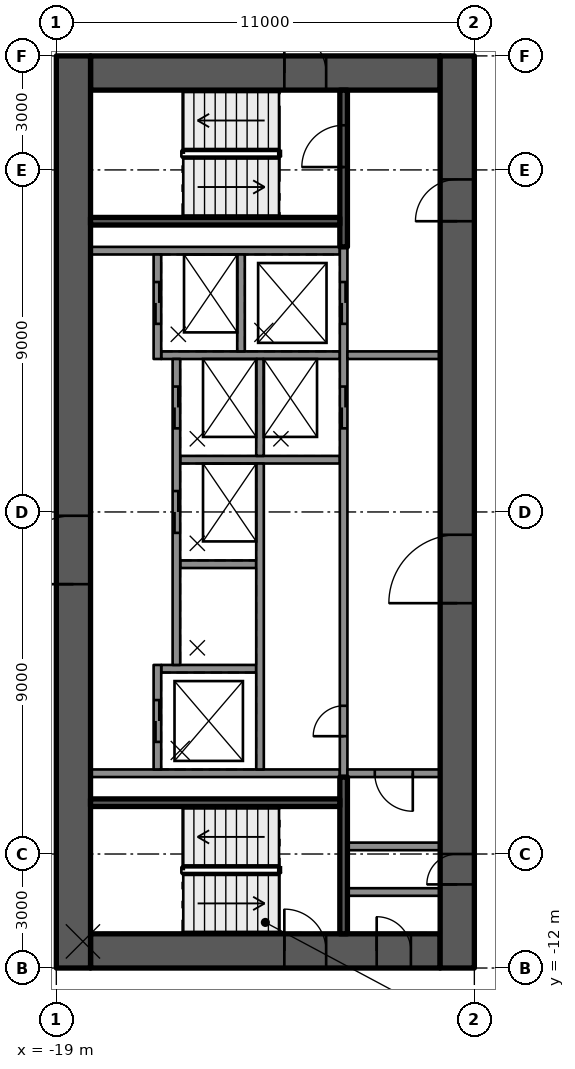
"""IFC4 building model, lengths in metres.
Left out: names, types, materials, properties, quantities, classifications, styles, units other than length and angle.
Written with IfcOpenShell. Run it as: python <this file> out.ifc"""

import sys

from ifc_helpers import new_model, si_unit, direction, frame, frame_2d, origin, place, context, subcontext, project, spatial, rectangle, extrude, element, fill, save


model = new_model("IFC4")
c1 = context("Model", 3, precision=1e-05, world=origin(), true_north=direction((0.0, 1.0)))
c2 = subcontext(c1, "Body", "Model", "MODEL_VIEW")
j1 = project(units=[si_unit("LENGTHUNIT", "METRE"), si_unit("PLANEANGLEUNIT", "RADIAN")], contexts=[c1])
p1 = place(None, origin())
s1 = spatial("IfcSite", under=j1, at=p1, CompositionType="ELEMENT")
p2 = place(p1, origin())
s2 = spatial("IfcBuilding", under=s1, at=p2, CompositionType="ELEMENT")
p3 = place(p2, frame((0.0, 0.0, 170.6)))
s3 = spatial("IfcBuildingStorey", under=s2, at=p3, CompositionType="ELEMENT", Elevation=170.6)
p4 = place(p3, frame((-18.1, 11.55, 0.0), z_axis=(0.0, 0.0, 1.0), x_axis=(1.0, 0.0, 0.0)))
e1 = element("IfcWall", 1, at=p4, inside=s3, PredefinedType="SHEAR", context=c2, shape_type="SweptSolid", body=[
    extrude(rectangle(XDim=9.2, YDim=0.9, at=frame_2d((4.6, 0.0))), origin(), (0.0, 0.0, 1.0), 3.5),
])
p5 = place(p4, frame((5.1, 0.0, 0.0)))
e2 = element("IfcOpeningElement", 2, at=p5, cuts=e1, PredefinedType="OPENING", context=c2, shape_type="SweptSolid", body=[
    extrude(rectangle(XDim=1.1, YDim=2.1, at=frame_2d((0.55, 1.05))), frame((0.0, 0.46, 0.0), z_axis=(0.0, -1.0, 0.0), x_axis=(1.0, 0.0, 0.0)), (0.0, 0.0, 1.0), 0.92),
])
p6 = place(p3, frame((-18.1, -11.55, 0.0), z_axis=(0.0, 0.0, 1.0), x_axis=(1.0, 0.0, 0.0)))
e3 = element("IfcWall", 3, at=p6, inside=s3, PredefinedType="SHEAR", context=c2, shape_type="SweptSolid", body=[
    extrude(rectangle(XDim=9.2, YDim=0.9, at=frame_2d((4.6, 0.0))), origin(), (0.0, 0.0, 1.0), 3.5),
])
p7 = place(p6, frame((5.1, 0.0, 0.0)))
e4 = element("IfcOpeningElement", 4, at=p7, cuts=e3, PredefinedType="OPENING", context=c2, shape_type="SweptSolid", body=[
    extrude(rectangle(XDim=1.1, YDim=2.1, at=frame_2d((0.55, 1.05))), frame((0.0, 0.46, 0.0), z_axis=(0.0, -1.0, 0.0), x_axis=(1.0, 0.0, 0.0)), (0.0, 0.0, 1.0), 0.92),
])
p8 = place(p6, frame((7.53, 0.0, 0.0)))
e5 = element("IfcOpeningElement", 5, at=p8, cuts=e3, PredefinedType="OPENING", context=c2, shape_type="SweptSolid", body=[
    extrude(rectangle(XDim=0.9, YDim=2.1, at=frame_2d((0.45, 1.05))), frame((0.0, 0.46, 0.0), z_axis=(0.0, -1.0, 0.0), x_axis=(1.0, 0.0, 0.0)), (0.0, 0.0, 1.0), 0.92),
])
p9 = place(p3, frame((-18.55, -12.0, 0.0), z_axis=(0.0, 0.0, 1.0), x_axis=(0.0, 1.0, 0.0)))
e6 = element("IfcWall", 6, at=p9, inside=s3, PredefinedType="SHEAR", context=c2, shape_type="SweptSolid", body=[
    extrude(rectangle(XDim=24.0, YDim=0.9, at=frame_2d((12.0, 0.0))), origin(), (0.0, 0.0, 1.0), 3.5),
])
p10 = place(p9, frame((10.1, 0.0, 0.0)))
e7 = element("IfcOpeningElement", 7, at=p10, cuts=e6, PredefinedType="OPENING", context=c2, shape_type="SweptSolid", body=[
    extrude(rectangle(XDim=1.8, YDim=2.1, at=frame_2d((0.9, 1.05))), frame((0.0, 0.46, 0.0), z_axis=(0.0, -1.0, 0.0), x_axis=(1.0, 0.0, 0.0)), (0.0, 0.0, 1.0), 0.92),
])
p11 = place(p3, frame((-8.45, -12.0, 0.0), z_axis=(0.0, 0.0, 1.0), x_axis=(0.0, 1.0, 0.0)))
e8 = element("IfcWall", 8, at=p11, inside=s3, PredefinedType="SHEAR", context=c2, shape_type="SweptSolid", body=[
    extrude(rectangle(XDim=24.0, YDim=0.9, at=frame_2d((12.0, 0.0))), origin(), (0.0, 0.0, 1.0), 3.5),
])
p12 = place(p11, frame((9.6, 0.0, 0.0)))
e9 = element("IfcOpeningElement", 9, at=p12, cuts=e8, PredefinedType="OPENING", context=c2, shape_type="SweptSolid", body=[
    extrude(rectangle(XDim=1.8, YDim=2.1, at=frame_2d((0.9, 1.05))), frame((0.0, 0.46, 0.0), z_axis=(0.0, -1.0, 0.0), x_axis=(1.0, 0.0, 0.0)), (0.0, 0.0, 1.0), 0.92),
])
p13 = place(p11, frame((19.65, 0.0, 0.0)))
e10 = element("IfcOpeningElement", 10, at=p13, cuts=e8, PredefinedType="OPENING", context=c2, shape_type="SweptSolid", body=[
    extrude(rectangle(XDim=1.1, YDim=2.1, at=frame_2d((0.55, 1.05))), frame((0.0, 0.46, 0.0), z_axis=(0.0, -1.0, 0.0), x_axis=(1.0, 0.0, 0.0)), (0.0, 0.0, 1.0), 0.92),
])
p14 = place(p11, frame((2.2, 0.0, 0.0)))
e11 = element("IfcOpeningElement", 11, at=p14, cuts=e8, PredefinedType="OPENING", context=c2, shape_type="SweptSolid", body=[
    extrude(rectangle(XDim=0.8, YDim=2.1, at=frame_2d((0.4, 1.05))), frame((0.0, 0.46, 0.0), z_axis=(0.0, -1.0, 0.0), x_axis=(1.0, 0.0, 0.0)), (0.0, 0.0, 1.0), 0.92),
])
for number, where, z_axis, x_axis in (
    (12, (-11.54, 6.875, 0.0), (0.0, 0.0, 1.0), (-1.0, 0.0, 0.0)),
    (13, (-11.54, -6.875, 0.0), (0.0, 0.0, 1.0), (-1.0, 0.0, 0.0)),
):
    element("IfcWall", number, at=place(p3, frame(where, z_axis=z_axis, x_axis=x_axis)), inside=s3, PredefinedType="SOLIDWALL", context=c2, shape_type="SweptSolid", body=[
        extrude(rectangle(XDim=6.56, YDim=0.2, at=frame_2d((3.28, 0.0))), origin(), (0.0, 0.0, 1.0), 3.08),
    ])
p15 = place(p3, frame((-13.74, -4.125, 0.0), z_axis=(0.0, 0.0, 1.0), x_axis=(-1.0, 0.0, 0.0)))
e14 = element("IfcWall", 14, at=p15, inside=s3, PredefinedType="SOLIDWALL", context=c2, shape_type="SweptSolid", body=[
    extrude(rectangle(XDim=2.5, YDim=0.2, at=frame_2d((1.25, 0.0))), origin(), (0.0, 0.0, 1.0), 3.08),
])
p16 = place(p3, frame((-13.74, -1.375, 0.0), z_axis=(0.0, 0.0, 1.0), x_axis=(-1.0, 0.0, 0.0)))
e15 = element("IfcWall", 15, at=p16, inside=s3, PredefinedType="SOLIDWALL", context=c2, shape_type="SweptSolid", body=[
    extrude(rectangle(XDim=2.0, YDim=0.2, at=frame_2d((1.0, 0.0))), origin(), (0.0, 0.0, 1.0), 3.08),
])
p17 = place(p3, frame((-11.54, 1.375, 0.0), z_axis=(0.0, 0.0, 1.0), x_axis=(-1.0, 0.0, 0.0)))
e16 = element("IfcWall", 16, at=p17, inside=s3, PredefinedType="SOLIDWALL", context=c2, shape_type="SweptSolid", body=[
    extrude(rectangle(XDim=4.2, YDim=0.2, at=frame_2d((2.1, 0.0))), origin(), (0.0, 0.0, 1.0), 3.08),
])
p18 = place(p3, frame((-11.54, 4.125, 0.0), z_axis=(0.0, 0.0, 1.0), x_axis=(-1.0, 0.0, 0.0)))
e17 = element("IfcWall", 17, at=p18, inside=s3, PredefinedType="SOLIDWALL", context=c2, shape_type="SweptSolid", body=[
    extrude(rectangle(XDim=4.7, YDim=0.2, at=frame_2d((2.35, 0.0))), origin(), (0.0, 0.0, 1.0), 3.08),
])
p19 = place(p3, frame((-11.44, -6.975, 0.0), z_axis=(0.0, 0.0, 1.0), x_axis=(0.0, 1.0, 0.0)))
e18 = element("IfcWall", 18, at=p19, inside=s3, PredefinedType="SOLIDWALL", context=c2, shape_type="SweptSolid", body=[
    extrude(rectangle(XDim=13.95, YDim=0.2, at=frame_2d((6.975, 0.0))), origin(), (0.0, 0.0, 1.0), 3.08),
])
p20 = place(p19, frame((9.175, 0.0, 0.0)))
e19 = element("IfcOpeningElement", 19, at=p20, cuts=e18, PredefinedType="OPENING", context=c2, shape_type="SweptSolid", body=[
    extrude(rectangle(XDim=1.1, YDim=2.1, at=frame_2d((0.55, 1.05))), frame((0.0, 0.11, 0.0), z_axis=(0.0, -1.0, 0.0), x_axis=(1.0, 0.0, 0.0)), (0.0, 0.0, 1.0), 0.22),
])
p21 = place(p19, frame((11.925, 0.0, 0.0)))
e20 = element("IfcOpeningElement", 20, at=p21, cuts=e18, PredefinedType="OPENING", context=c2, shape_type="SweptSolid", body=[
    extrude(rectangle(XDim=1.1, YDim=2.1, at=frame_2d((0.55, 1.05))), frame((0.0, 0.11, 0.0), z_axis=(0.0, -1.0, 0.0), x_axis=(1.0, 0.0, 0.0)), (0.0, 0.0, 1.0), 0.22),
])
p22 = place(p19, frame((1.075, 0.0, 0.0)))
e21 = element("IfcOpeningElement", 21, at=p22, cuts=e18, PredefinedType="OPENING", context=c2, shape_type="SweptSolid", body=[
    extrude(rectangle(XDim=0.8, YDim=2.1, at=frame_2d((0.4, 1.05))), frame((0.0, 0.11, 0.0), z_axis=(0.0, -1.0, 0.0), x_axis=(1.0, 0.0, 0.0)), (0.0, 0.0, 1.0), 0.22),
])
p23 = place(p3, frame((-13.64, -6.775, 0.0), z_axis=(0.0, 0.0, 1.0), x_axis=(0.0, 1.0, 0.0)))
e22 = element("IfcWall", 22, at=p23, inside=s3, PredefinedType="SOLIDWALL", context=c2, shape_type="SweptSolid", body=[
    extrude(rectangle(XDim=8.05, YDim=0.2, at=frame_2d((4.025, 0.0))), origin(), (0.0, 0.0, 1.0), 3.08),
])
for number, where, z_axis, x_axis in (
    (23, (-13.64, 1.475, 0.0), (0.0, 0.0, 1.0), (0.0, 1.0, 0.0)),
    (24, (-14.14, 4.225, 0.0), (0.0, 0.0, 1.0), (0.0, 1.0, 0.0)),
):
    element("IfcWall", number, at=place(p3, frame(where, z_axis=z_axis, x_axis=x_axis)), inside=s3, PredefinedType="SOLIDWALL", context=c2, shape_type="SweptSolid", body=[
        extrude(rectangle(XDim=2.55, YDim=0.2, at=frame_2d((1.275, 0.0))), origin(), (0.0, 0.0, 1.0), 3.08),
    ])
p24 = place(p3, frame((-16.34, -6.775, 0.0), z_axis=(0.0, 0.0, 1.0), x_axis=(0.0, 1.0, 0.0)))
e25 = element("IfcWall", 25, at=p24, inside=s3, PredefinedType="SOLIDWALL", context=c2, shape_type="SweptSolid", body=[
    extrude(rectangle(XDim=2.75, YDim=0.2, at=frame_2d((1.375, 0.0))), origin(), (0.0, 0.0, 1.0), 3.08),
])
p25 = place(p24, frame((0.725, 0.0, 0.0)))
e26 = element("IfcOpeningElement", 26, at=p25, cuts=e25, PredefinedType="OPENING", context=c2, shape_type="SweptSolid", body=[
    extrude(rectangle(XDim=1.1, YDim=2.1, at=frame_2d((0.55, 1.05))), frame((0.0, 0.11, 0.0), z_axis=(0.0, -1.0, 0.0), x_axis=(1.0, 0.0, 0.0)), (0.0, 0.0, 1.0), 0.22),
])
p26 = place(p3, frame((-15.84, -4.025, 0.0), z_axis=(0.0, 0.0, 1.0), x_axis=(0.0, 1.0, 0.0)))
e27 = element("IfcWall", 27, at=p26, inside=s3, PredefinedType="SOLIDWALL", context=c2, shape_type="SweptSolid", body=[
    extrude(rectangle(XDim=8.05, YDim=0.2, at=frame_2d((4.025, 0.0))), origin(), (0.0, 0.0, 1.0), 3.08),
])
p27 = place(p26, frame((3.475, 0.0, 0.0)))
e28 = element("IfcOpeningElement", 28, at=p27, cuts=e27, PredefinedType="OPENING", context=c2, shape_type="SweptSolid", body=[
    extrude(rectangle(XDim=1.1, YDim=2.1, at=frame_2d((0.55, 1.05))), frame((0.0, 0.11, 0.0), z_axis=(0.0, -1.0, 0.0), x_axis=(1.0, 0.0, 0.0)), (0.0, 0.0, 1.0), 0.22),
])
p28 = place(p26, frame((6.225, 0.0, 0.0)))
e29 = element("IfcOpeningElement", 29, at=p28, cuts=e27, PredefinedType="OPENING", context=c2, shape_type="SweptSolid", body=[
    extrude(rectangle(XDim=1.1, YDim=2.1, at=frame_2d((0.55, 1.05))), frame((0.0, 0.11, 0.0), z_axis=(0.0, -1.0, 0.0), x_axis=(1.0, 0.0, 0.0)), (0.0, 0.0, 1.0), 0.22),
])
p29 = place(p3, frame((-16.34, 4.025, 0.0), z_axis=(0.0, 0.0, 1.0), x_axis=(0.0, 1.0, 0.0)))
e30 = element("IfcWall", 30, at=p29, inside=s3, PredefinedType="SOLIDWALL", context=c2, shape_type="SweptSolid", body=[
    extrude(rectangle(XDim=2.75, YDim=0.2, at=frame_2d((1.375, 0.0))), origin(), (0.0, 0.0, 1.0), 3.08),
])
p30 = place(p29, frame((0.925, 0.0, 0.0)))
e31 = element("IfcOpeningElement", 31, at=p30, cuts=e30, PredefinedType="OPENING", context=c2, shape_type="SweptSolid", body=[
    extrude(rectangle(XDim=1.1, YDim=2.1, at=frame_2d((0.55, 1.05))), frame((0.0, 0.11, 0.0), z_axis=(0.0, -1.0, 0.0), x_axis=(1.0, 0.0, 0.0)), (0.0, 0.0, 1.0), 0.22),
])
p31 = place(p3, frame((-11.44, 6.975, 0.0), z_axis=(0.0, 0.0, 1.0), x_axis=(0.0, 1.0, 0.0)))
e32 = element("IfcWall", 32, at=p31, inside=s3, PredefinedType="SOLIDWALL", context=c2, shape_type="SweptSolid", body=[
    extrude(rectangle(XDim=4.125, YDim=0.2, at=frame_2d((2.062, 0.0))), origin(), (0.0, 0.0, 1.0), 3.08),
])
p32 = place(p31, frame((2.1, 0.0, 0.0)))
e33 = element("IfcOpeningElement", 33, at=p32, cuts=e32, PredefinedType="OPENING", context=c2, shape_type="SweptSolid", body=[
    extrude(rectangle(XDim=1.1, YDim=2.1, at=frame_2d((0.55, 1.05))), frame((0.0, 0.11, 0.0), z_axis=(0.0, -1.0, 0.0), x_axis=(1.0, 0.0, 0.0)), (0.0, 0.0, 1.0), 0.22),
])
p33 = place(p3, frame((-11.54, 7.65, 0.0), z_axis=(0.0, 0.0, 1.0), x_axis=(-1.0, 0.0, 0.0)))
e34 = element("IfcWall", 34, at=p33, inside=s3, PredefinedType="SOLIDWALL", context=c2, shape_type="SweptSolid", body=[
    extrude(rectangle(XDim=6.56, YDim=0.2, at=frame_2d((3.28, 0.0))), origin(), (0.0, 0.0, 1.0), 3.08),
])
p34 = place(p3, frame((-11.44, -11.1, 0.0), z_axis=(0.0, 0.0, 1.0), x_axis=(0.0, 1.0, 0.0)))
e35 = element("IfcWall", 35, at=p34, inside=s3, PredefinedType="SOLIDWALL", context=c2, shape_type="SweptSolid", body=[
    extrude(rectangle(XDim=4.125, YDim=0.2, at=frame_2d((2.062, 0.0))), origin(), (0.0, 0.0, 1.0), 3.08),
])
p35 = place(p3, frame((-11.54, -7.65, 0.0), z_axis=(0.0, 0.0, 1.0), x_axis=(-1.0, 0.0, 0.0)))
e36 = element("IfcWall", 36, at=p35, inside=s3, PredefinedType="SOLIDWALL", context=c2, shape_type="SweptSolid", body=[
    extrude(rectangle(XDim=6.56, YDim=0.2, at=frame_2d((3.28, 0.0))), origin(), (0.0, 0.0, 1.0), 3.08),
])
p36 = place(p3, frame((-8.9, 4.125, 0.0), z_axis=(0.0, 0.0, 1.0), x_axis=(-1.0, 0.0, 0.0)))
e37 = element("IfcWall", 37, at=p36, inside=s3, PredefinedType="PARTITIONING", context=c2, shape_type="SweptSolid", body=[
    extrude(rectangle(XDim=2.44, YDim=0.2, at=frame_2d((1.22, 0.0))), origin(), (0.0, 0.0, 1.0), 3.08),
])
p37 = place(p3, frame((-8.9, -6.875, 0.0), z_axis=(0.0, 0.0, 1.0), x_axis=(-1.0, 0.0, 0.0)))
e38 = element("IfcWall", 38, at=p37, inside=s3, PredefinedType="PARTITIONING", context=c2, shape_type="SweptSolid", body=[
    extrude(rectangle(XDim=2.44, YDim=0.2, at=frame_2d((1.22, 0.0))), origin(), (0.0, 0.0, 1.0), 3.08),
])
p38 = place(p37, frame((0.72, 0.0, 0.0)))
e39 = element("IfcOpeningElement", 39, at=p38, cuts=e38, PredefinedType="OPENING", context=c2, shape_type="SweptSolid", body=[
    extrude(rectangle(XDim=1.0, YDim=2.1, at=frame_2d((0.5, 1.05))), frame((0.0, 0.11, 0.0), z_axis=(0.0, -1.0, 0.0), x_axis=(1.0, 0.0, 0.0)), (0.0, 0.0, 1.0), 0.22),
])
for number, where, z_axis, x_axis in (
    (40, (-8.9, -10.0, 0.0), (0.0, 0.0, 1.0), (-1.0, 0.0, 0.0)),
    (41, (-8.9, -8.8, 0.0), (0.0, 0.0, 1.0), (-1.0, 0.0, 0.0)),
):
    element("IfcWall", number, at=place(p3, frame(where, z_axis=z_axis, x_axis=x_axis)), inside=s3, PredefinedType="PARTITIONING", context=c2, shape_type="SweptSolid", body=[
        extrude(rectangle(XDim=2.44, YDim=0.2, at=frame_2d((1.22, 0.0))), origin(), (0.0, 0.0, 1.0), 3.08),
    ])
p39 = place(p25, origin())
e42 = element("IfcDoor", 42, at=p39, inside=s3, OperationType="DOUBLE_DOOR_SLIDING", PredefinedType="DOOR", context=c2, shape_type="SweptSolid", body=[
    extrude(rectangle(XDim=1.1, YDim=2.1, at=frame_2d((0.55, 1.05))), frame((0.0, 0.025, 0.0), z_axis=(0.0, -1.0, 0.0), x_axis=(1.0, 0.0, 0.0)), (0.0, 0.0, 1.0), 0.05),
])
fill(e26, e42)
p40 = place(p27, origin())
e43 = element("IfcDoor", 43, at=p40, inside=s3, OperationType="DOUBLE_DOOR_SLIDING", PredefinedType="DOOR", context=c2, shape_type="SweptSolid", body=[
    extrude(rectangle(XDim=1.1, YDim=2.1, at=frame_2d((0.55, 1.05))), frame((0.0, 0.025, 0.0), z_axis=(0.0, -1.0, 0.0), x_axis=(1.0, 0.0, 0.0)), (0.0, 0.0, 1.0), 0.05),
])
fill(e28, e43)
p41 = place(p20, origin())
e44 = element("IfcDoor", 44, at=p41, inside=s3, OperationType="DOUBLE_DOOR_SLIDING", PredefinedType="DOOR", context=c2, shape_type="SweptSolid", body=[
    extrude(rectangle(XDim=1.1, YDim=2.1, at=frame_2d((0.55, 1.05))), frame((0.0, 0.025, 0.0), z_axis=(0.0, -1.0, 0.0), x_axis=(1.0, 0.0, 0.0)), (0.0, 0.0, 1.0), 0.05),
])
fill(e19, e44)
p42 = place(p28, origin())
e45 = element("IfcDoor", 45, at=p42, inside=s3, OperationType="DOUBLE_DOOR_SLIDING", PredefinedType="DOOR", context=c2, shape_type="SweptSolid", body=[
    extrude(rectangle(XDim=1.1, YDim=2.1, at=frame_2d((0.55, 1.05))), frame((0.0, 0.025, 0.0), z_axis=(0.0, -1.0, 0.0), x_axis=(1.0, 0.0, 0.0)), (0.0, 0.0, 1.0), 0.05),
])
fill(e29, e45)
p43 = place(p21, origin())
e46 = element("IfcDoor", 46, at=p43, inside=s3, OperationType="DOUBLE_DOOR_SLIDING", PredefinedType="DOOR", context=c2, shape_type="SweptSolid", body=[
    extrude(rectangle(XDim=1.1, YDim=2.1, at=frame_2d((0.55, 1.05))), frame((0.0, 0.025, 0.0), z_axis=(0.0, -1.0, 0.0), x_axis=(1.0, 0.0, 0.0)), (0.0, 0.0, 1.0), 0.05),
])
fill(e20, e46)
p44 = place(p30, origin())
e47 = element("IfcDoor", 47, at=p44, inside=s3, OperationType="DOUBLE_DOOR_SLIDING", PredefinedType="DOOR", context=c2, shape_type="SweptSolid", body=[
    extrude(rectangle(XDim=1.1, YDim=2.1, at=frame_2d((0.55, 1.05))), frame((0.0, 0.025, 0.0), z_axis=(0.0, -1.0, 0.0), x_axis=(1.0, 0.0, 0.0)), (0.0, 0.0, 1.0), 0.05),
])
fill(e31, e47)
p45 = place(p22, origin())
e48 = element("IfcDoor", 48, at=p45, inside=s3, OperationType="SINGLE_SWING_LEFT", PredefinedType="DOOR", context=c2, shape_type="SweptSolid", body=[
    extrude(rectangle(XDim=0.8, YDim=2.1, at=frame_2d((0.4, 1.05))), frame((0.0, 0.025, 0.0), z_axis=(0.0, -1.0, 0.0), x_axis=(1.0, 0.0, 0.0)), (0.0, 0.0, 1.0), 0.05),
])
fill(e21, e48)
p46 = place(p12, origin())
e49 = element("IfcDoor", 49, at=p46, inside=s3, OperationType="SINGLE_SWING_LEFT", PredefinedType="DOOR", context=c2, shape_type="SweptSolid", body=[
    extrude(rectangle(XDim=1.8, YDim=2.1, at=frame_2d((0.9, 1.05))), frame((0.0, 0.025, 0.0), z_axis=(0.0, -1.0, 0.0), x_axis=(1.0, 0.0, 0.0)), (0.0, 0.0, 1.0), 0.05),
])
fill(e9, e49)
p47 = place(p10, origin())
e50 = element("IfcDoor", 50, at=p47, inside=s3, OperationType="SINGLE_SWING_LEFT", PredefinedType="DOOR", context=c2, shape_type="SweptSolid", body=[
    extrude(rectangle(XDim=1.8, YDim=2.1, at=frame_2d((0.9, 1.05))), frame((0.0, 0.025, 0.0), z_axis=(0.0, -1.0, 0.0), x_axis=(1.0, 0.0, 0.0)), (0.0, 0.0, 1.0), 0.05),
])
fill(e7, e50)
p48 = place(p13, origin())
e51 = element("IfcDoor", 51, at=p48, inside=s3, OperationType="SINGLE_SWING_RIGHT", PredefinedType="DOOR", context=c2, shape_type="SweptSolid", body=[
    extrude(rectangle(XDim=1.1, YDim=2.1, at=frame_2d((0.55, 1.05))), frame((0.0, 0.025, 0.0), z_axis=(0.0, -1.0, 0.0), x_axis=(1.0, 0.0, 0.0)), (0.0, 0.0, 1.0), 0.05),
])
fill(e10, e51)
p49 = place(p5, origin())
e52 = element("IfcDoor", 52, at=p49, inside=s3, OperationType="SINGLE_SWING_RIGHT", PredefinedType="DOOR", context=c2, shape_type="SweptSolid", body=[
    extrude(rectangle(XDim=1.1, YDim=2.1, at=frame_2d((0.55, 1.05))), frame((0.0, 0.025, 0.0), z_axis=(0.0, -1.0, 0.0), x_axis=(1.0, 0.0, 0.0)), (0.0, 0.0, 1.0), 0.05),
])
fill(e2, e52)
p50 = place(p7, origin())
e53 = element("IfcDoor", 53, at=p50, inside=s3, OperationType="SINGLE_SWING_RIGHT", PredefinedType="DOOR", context=c2, shape_type="SweptSolid", body=[
    extrude(rectangle(XDim=1.1, YDim=2.1, at=frame_2d((0.55, 1.05))), frame((0.0, 0.025, 0.0), z_axis=(0.0, -1.0, 0.0), x_axis=(1.0, 0.0, 0.0)), (0.0, 0.0, 1.0), 0.05),
])
fill(e4, e53)
p51 = place(p32, origin())
e54 = element("IfcDoor", 54, at=p51, inside=s3, OperationType="SINGLE_SWING_RIGHT", PredefinedType="DOOR", context=c2, shape_type="SweptSolid", body=[
    extrude(rectangle(XDim=1.1, YDim=2.1, at=frame_2d((0.55, 1.05))), frame((0.0, 0.025, 0.0), z_axis=(0.0, -1.0, 0.0), x_axis=(1.0, 0.0, 0.0)), (0.0, 0.0, 1.0), 0.05),
])
fill(e33, e54)
p52 = place(p8, origin())
e55 = element("IfcDoor", 55, at=p52, inside=s3, OperationType="SINGLE_SWING_RIGHT", PredefinedType="DOOR", context=c2, shape_type="SweptSolid", body=[
    extrude(rectangle(XDim=0.9, YDim=2.1, at=frame_2d((0.45, 1.05))), frame((0.0, 0.025, 0.0), z_axis=(0.0, -1.0, 0.0), x_axis=(1.0, 0.0, 0.0)), (0.0, 0.0, 1.0), 0.05),
])
fill(e5, e55)
p53 = place(p14, origin())
e56 = element("IfcDoor", 56, at=p53, inside=s3, OperationType="SINGLE_SWING_LEFT", PredefinedType="DOOR", context=c2, shape_type="SweptSolid", body=[
    extrude(rectangle(XDim=0.8, YDim=2.1, at=frame_2d((0.4, 1.05))), frame((0.0, 0.025, 0.0), z_axis=(0.0, -1.0, 0.0), x_axis=(1.0, 0.0, 0.0)), (0.0, 0.0, 1.0), 0.05),
])
fill(e11, e56)
p54 = place(p38, origin())
e57 = element("IfcDoor", 57, at=p54, inside=s3, OperationType="SINGLE_SWING_RIGHT", PredefinedType="DOOR", context=c2, shape_type="SweptSolid", body=[
    extrude(rectangle(XDim=1.0, YDim=2.1, at=frame_2d((0.5, 1.05))), frame((0.0, 0.025, 0.0), z_axis=(0.0, -1.0, 0.0), x_axis=(1.0, 0.0, 0.0)), (0.0, 0.0, 1.0), 0.05),
])
fill(e39, e57)
save(model, sys.argv[1])
